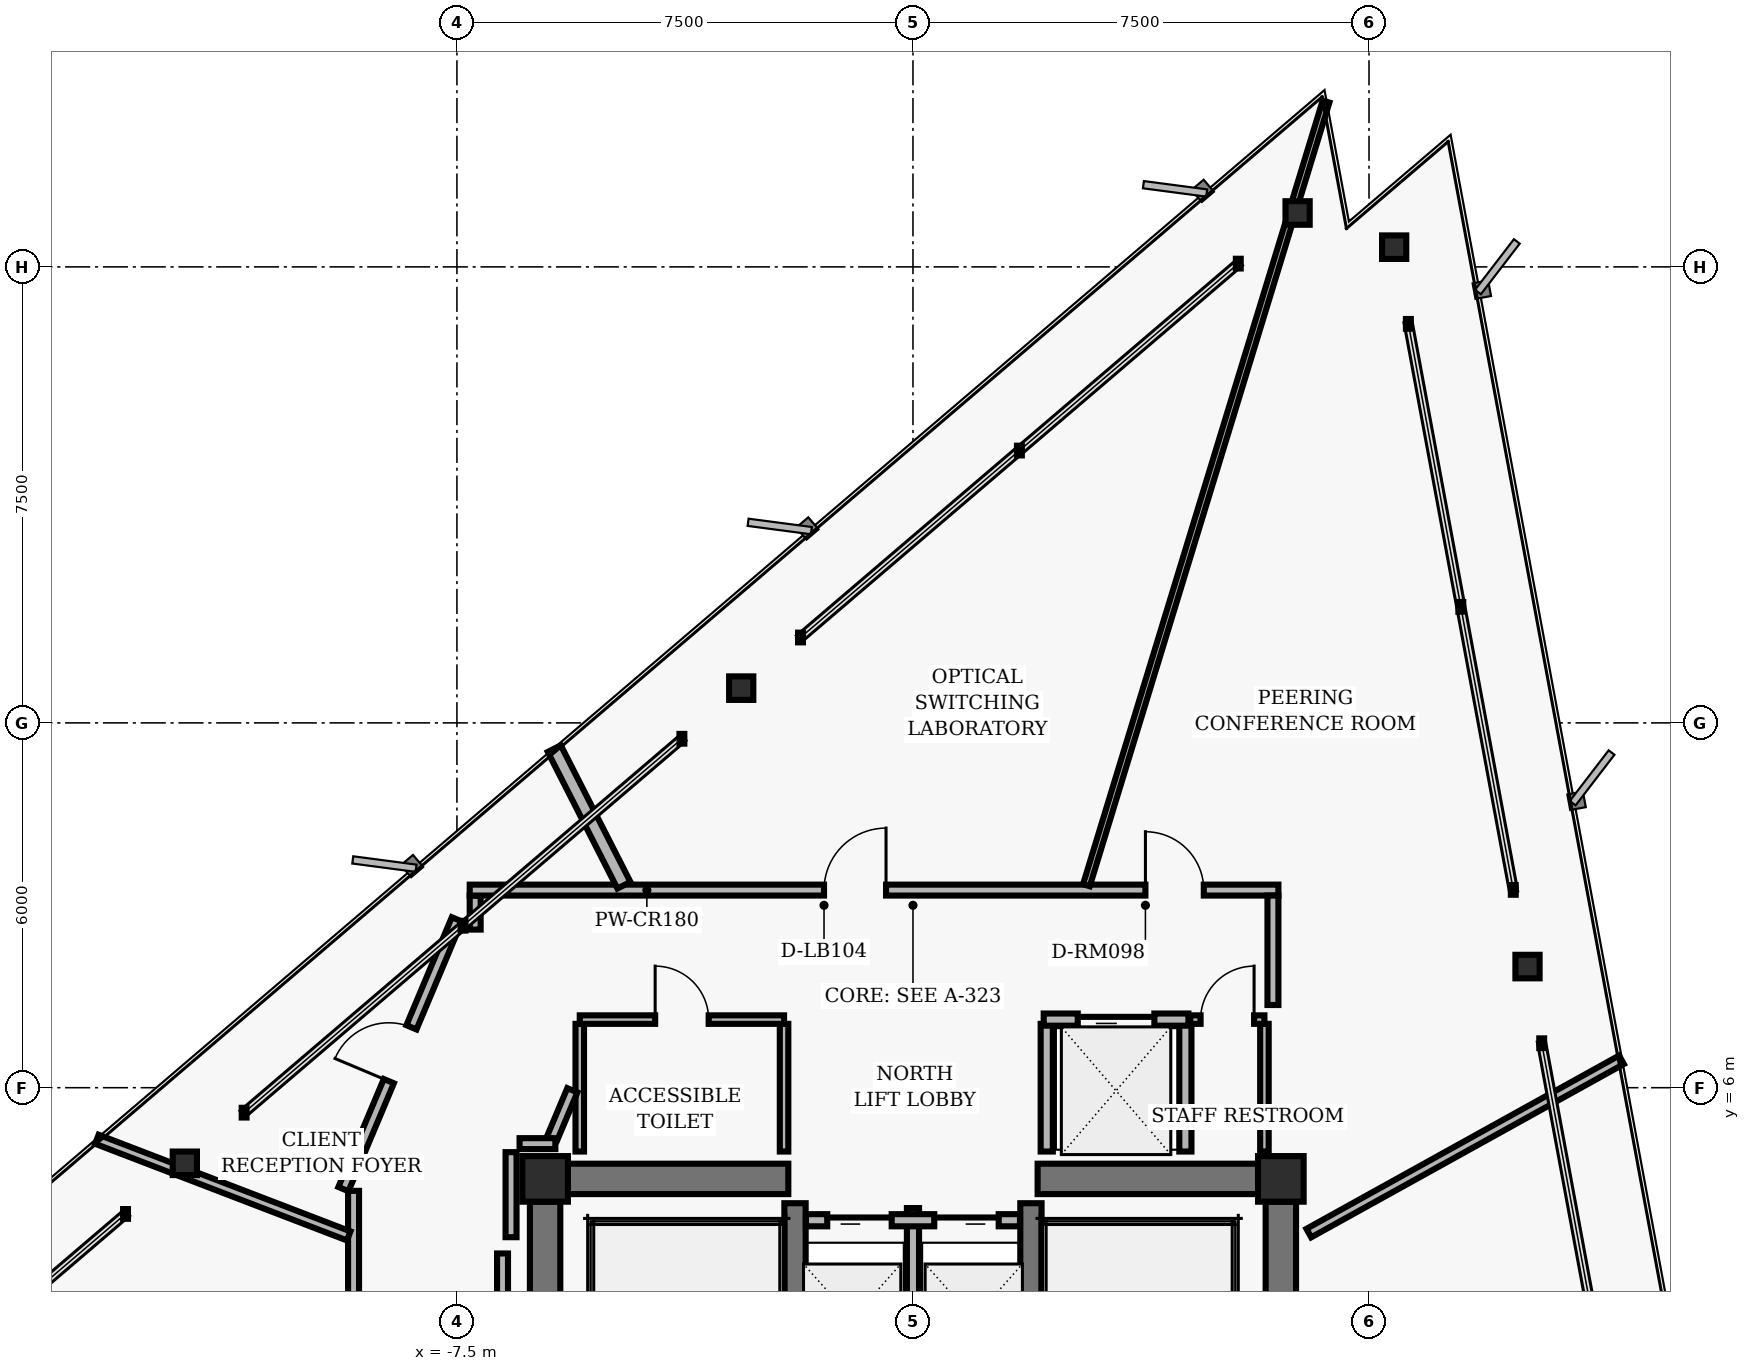
"""IFC4 building model, lengths in metres.
Left out: names, types, materials, properties, quantities, classifications, styles, units other than length and angle.
Written with IfcOpenShell. Run it as: python <this file> out.ifc"""

import sys

from ifc_helpers import new_model, si_unit, direction, frame, frame_2d, origin, origin_2d, place, context, subcontext, project, spatial, rectangle, hollow_rectangle, i_section, extrude, element, fill, save


model = new_model("IFC4")
c1 = context("Model", 3, precision=1e-05, world=origin(), true_north=direction((0.0, 1.0)))
c2 = subcontext(c1, "Body", "Model", "MODEL_VIEW")
j1 = project(units=[si_unit("LENGTHUNIT", "METRE"), si_unit("PLANEANGLEUNIT", "RADIAN")], contexts=[c1])
p1 = place(None, origin())
s1 = spatial("IfcSite", under=j1, at=p1, CompositionType="ELEMENT")
p2 = place(p1, origin())
s2 = spatial("IfcBuilding", under=s1, at=p2, CompositionType="ELEMENT")
p3 = place(p2, frame((0.0, 0.0, 178.4)))
s3 = spatial("IfcBuildingStorey", under=s2, at=p3, CompositionType="ELEMENT", Elevation=178.4)
for number, where, z_axis, x_axis in (
    (1, (-6.05, 4.5, 0.0), (0.0, 0.0, 1.0), (1.0, 0.0, 0.0)),
    (2, (6.05, 4.5, 0.0), (0.0, 0.0, 1.0), (1.0, 0.0, 0.0)),
):
    element("IfcColumn", number, at=place(p3, frame(where, z_axis=z_axis, x_axis=x_axis)), inside=s3, PredefinedType="COLUMN", context=c2, shape_type="SweptSolid", body=[
        extrude(hollow_rectangle(XDim=0.75, YDim=0.75, WallThickness=0.05, InnerFilletRadius=0.02, OuterFilletRadius=0.04, at=origin_2d()), origin(), (0.0, 0.0, 1.0), 3.04),
    ])
for number, where, z_axis, x_axis in (
    (3, (-6.05, 0.375, 0.0), (0.0, 0.0, 1.0), (0.0, 1.0, 0.0)),
    (4, (6.05, 0.375, 0.0), (0.0, 0.0, 1.0), (0.0, 1.0, 0.0)),
):
    element("IfcWall", number, at=place(p3, frame(where, z_axis=z_axis, x_axis=x_axis)), inside=s3, PredefinedType="SHEAR", context=c2, shape_type="SweptSolid", body=[
        extrude(rectangle(XDim=3.75, YDim=0.5, at=frame_2d((1.875, 0.0))), origin(), (0.0, 0.0, 1.0), 2.798),
    ])
for number, where, z_axis, x_axis in (
    (5, (-1.94, -4.1, 0.0), (0.0, 0.0, 1.0), (0.0, 1.0, 0.0)),
    (6, (1.94, -4.1, 0.0), (0.0, 0.0, 1.0), (0.0, 1.0, 0.0)),
):
    element("IfcWall", number, at=place(p3, frame(where, z_axis=z_axis, x_axis=x_axis)), inside=s3, PredefinedType="SHEAR", context=c2, shape_type="SweptSolid", body=[
        extrude(rectangle(XDim=8.2, YDim=0.35, at=frame_2d((4.1, 0.0))), origin(), (0.0, 0.0, 1.0), 2.798),
    ])
for number, where, z_axis, x_axis in (
    (7, (-5.675, 4.5, 0.0), (0.0, 0.0, 1.0), (1.0, 0.0, 0.0)),
    (8, (2.05, 4.5, 0.0), (0.0, 0.0, 1.0), (1.0, 0.0, 0.0)),
):
    element("IfcWall", number, at=place(p3, frame(where, z_axis=z_axis, x_axis=x_axis)), inside=s3, PredefinedType="SHEAR", context=c2, shape_type="SweptSolid", body=[
        extrude(rectangle(XDim=3.625, YDim=0.5, at=frame_2d((1.812, 0.0))), origin(), (0.0, 0.0, 1.0), 2.798),
    ])
for number, where, z_axis, x_axis in (
    (9, (10.107, 7.992, 0.0), (0.0, 0.0, 1.0), (1.0, 0.0, 0.0)),
    (10, (7.914, 19.824, 0.0), (0.0, 0.0, 1.0), (1.0, 0.0, 0.0)),
    (11, (6.325, 20.387, 0.0), (0.0, 0.0, 1.0), (1.0, 0.0, 0.0)),
    (12, (-2.825, 12.572, 0.0), (0.0, 0.0, 1.0), (1.0, 0.0, 0.0)),
    (13, (-11.975, 4.757, 0.0), (0.0, 0.0, 1.0), (1.0, 0.0, 0.0)),
):
    element("IfcColumn", number, at=place(p3, frame(where, z_axis=z_axis, x_axis=x_axis)), inside=s3, PredefinedType="COLUMN", context=c2, shape_type="SweptSolid", body=[
        extrude(i_section(OverallWidth=0.398, OverallDepth=0.387, WebThickness=0.021, FlangeThickness=0.033, FilletRadius=0.018, at=origin_2d()), origin(), (0.0, 0.0, 1.0), 3.04),
    ])
p4 = place(p3, frame((0.0, 1.25, 0.0), z_axis=(0.0, 0.0, 1.0), x_axis=(0.0, 1.0, 0.0)))
e14 = element("IfcWall", 14, at=p4, inside=s3, PredefinedType="PARTITIONING", context=c2, shape_type="SweptSolid", body=[
    extrude(rectangle(XDim=2.77, YDim=0.2, at=frame_2d((1.385, 0.0))), origin(), (0.0, 0.0, 1.0), 2.773),
])
p5 = place(p3, frame((-1.76, 3.82, 0.0), z_axis=(0.0, 0.0, 1.0), x_axis=(1.0, 0.0, 0.0)))
e15 = element("IfcWall", 15, at=p5, inside=s3, PredefinedType="PARTITIONING", context=c2, shape_type="SweptSolid", body=[
    extrude(rectangle(XDim=3.52, YDim=0.2, at=frame_2d((1.76, 0.0))), origin(), (0.0, 0.0, 1.0), 2.773),
])
p6 = place(p5, frame((0.35, 0.0, 0.0)))
e16 = element("IfcOpeningElement", 16, at=p6, cuts=e15, PredefinedType="OPENING", context=c2, shape_type="SweptSolid", body=[
    extrude(rectangle(XDim=1.06, YDim=2.04, at=frame_2d((0.53, 1.02))), frame((0.0, 0.11, 0.0), z_axis=(0.0, -1.0, 0.0), x_axis=(1.0, 0.0, 0.0)), (0.0, 0.0, 1.0), 0.22),
])
p7 = place(p5, frame((2.11, 0.0, 0.0)))
e17 = element("IfcOpeningElement", 17, at=p7, cuts=e15, PredefinedType="OPENING", context=c2, shape_type="SweptSolid", body=[
    extrude(rectangle(XDim=1.06, YDim=2.04, at=frame_2d((0.53, 1.02))), frame((0.0, 0.11, 0.0), z_axis=(0.0, -1.0, 0.0), x_axis=(1.0, 0.0, 0.0)), (0.0, 0.0, 1.0), 0.22),
])
for number, where, z_axis, x_axis in (
    (18, (2.2, 4.95, 0.0), (0.0, 0.0, 1.0), (0.0, 1.0, 0.0)),
    (19, (4.48, 4.95, 0.0), (0.0, 0.0, 1.0), (0.0, 1.0, 0.0)),
):
    element("IfcWall", number, at=place(p3, frame(where, z_axis=z_axis, x_axis=x_axis)), inside=s3, PredefinedType="PARTITIONING", context=c2, shape_type="SweptSolid", body=[
        extrude(rectangle(XDim=2.1, YDim=0.2, at=frame_2d((1.05, 0.0))), origin(), (0.0, 0.0, 1.0), 2.773),
    ])
p8 = place(p3, frame((2.15, 7.12, 0.0), z_axis=(0.0, 0.0, 1.0), x_axis=(1.0, 0.0, 0.0)))
e20 = element("IfcWall", 20, at=p8, inside=s3, PredefinedType="PARTITIONING", context=c2, shape_type="SweptSolid", body=[
    extrude(rectangle(XDim=2.38, YDim=0.2, at=frame_2d((1.19, 0.0))), origin(), (0.0, 0.0, 1.0), 2.773),
])
p9 = place(p8, frame((0.56, 0.0, 0.0)))
e21 = element("IfcOpeningElement", 21, at=p9, cuts=e20, PredefinedType="OPENING", context=c2, shape_type="SweptSolid", body=[
    extrude(rectangle(XDim=1.26, YDim=2.06, at=frame_2d((0.63, 1.03))), frame((0.0, 0.11, 0.0), z_axis=(0.0, -1.0, 0.0), x_axis=(1.0, 0.0, 0.0)), (0.0, 0.0, 1.0), 0.22),
])
for number, where, z_axis, x_axis in (
    (22, (-5.48, 4.95, 0.0), (0.0, 0.0, 1.0), (0.0, 1.0, 0.0)),
    (23, (-2.12, 4.95, 0.0), (0.0, 0.0, 1.0), (0.0, 1.0, 0.0)),
):
    element("IfcWall", number, at=place(p3, frame(where, z_axis=z_axis, x_axis=x_axis)), inside=s3, PredefinedType="PARTITIONING", context=c2, shape_type="SweptSolid", body=[
        extrude(rectangle(XDim=2.1, YDim=0.14, at=frame_2d((1.05, 0.0))), origin(), (0.0, 0.0, 1.0), 2.773),
    ])
p10 = place(p3, frame((-5.48, 7.12, 0.0), z_axis=(0.0, 0.0, 1.0), x_axis=(1.0, 0.0, 0.0)))
e24 = element("IfcWall", 24, at=p10, inside=s3, PredefinedType="PARTITIONING", context=c2, shape_type="SweptSolid", body=[
    extrude(rectangle(XDim=3.36, YDim=0.14, at=frame_2d((1.68, 0.0))), origin(), (0.0, 0.0, 1.0), 2.773),
])
p11 = place(p10, frame((1.24, 0.0, 0.0)))
e25 = element("IfcOpeningElement", 25, at=p11, cuts=e24, PredefinedType="OPENING", context=c2, shape_type="SweptSolid", body=[
    extrude(rectangle(XDim=0.88, YDim=2.02, at=frame_2d((0.44, 1.01))), frame((0.0, 0.08, 0.0), z_axis=(0.0, -1.0, 0.0), x_axis=(1.0, 0.0, 0.0)), (0.0, 0.0, 1.0), 0.16),
])
p12 = place(p3, frame((5.78, 4.95, 0.0), z_axis=(0.0, 0.0, 1.0), x_axis=(0.0, 1.0, 0.0)))
e26 = element("IfcWall", 26, at=p12, inside=s3, PredefinedType="PARTITIONING", context=c2, shape_type="SweptSolid", body=[
    extrude(rectangle(XDim=2.1, YDim=0.14, at=frame_2d((1.05, 0.0))), origin(), (0.0, 0.0, 1.0), 2.253),
])
p13 = place(p3, frame((4.56, 7.12, 0.0), z_axis=(0.0, 0.0, 1.0), x_axis=(1.0, 0.0, 0.0)))
e27 = element("IfcWall", 27, at=p13, inside=s3, PredefinedType="PARTITIONING", context=c2, shape_type="SweptSolid", body=[
    extrude(rectangle(XDim=1.22, YDim=0.14, at=frame_2d((0.61, 0.0))), origin(), (0.0, 0.0, 1.0), 2.773),
])
p14 = place(p13, frame((0.17, 0.0, 0.0)))
e28 = element("IfcOpeningElement", 28, at=p14, cuts=e27, PredefinedType="OPENING", context=c2, shape_type="SweptSolid", body=[
    extrude(rectangle(XDim=0.88, YDim=2.02, at=frame_2d((0.44, 1.01))), frame((0.0, 0.08, 0.0), z_axis=(0.0, -1.0, 0.0), x_axis=(1.0, 0.0, 0.0)), (0.0, 0.0, 1.0), 0.16),
])
p15 = place(p3, frame((-9.2, -4.303, 0.0), z_axis=(0.0, 0.0, 1.0), x_axis=(0.0, 1.0, 0.0)))
e29 = element("IfcWall", 29, at=p15, inside=s3, PredefinedType="PARTITIONING", context=c2, shape_type="SweptSolid", body=[
    extrude(rectangle(XDim=8.607, YDim=0.18, at=frame_2d((4.303, 0.0))), origin(), (0.0, 0.0, 1.0), 2.773),
])
p16 = place(p15, frame((3.582, 0.0, 0.0)))
e30 = element("IfcOpeningElement", 30, at=p16, cuts=e29, PredefinedType="OPENING", context=c2, shape_type="SweptSolid", body=[
    extrude(rectangle(XDim=0.96, YDim=2.02, at=frame_2d((0.48, 1.01))), frame((0.0, 0.1, 0.0), z_axis=(0.0, -1.0, 0.0), x_axis=(1.0, 0.0, 0.0)), (0.0, 0.0, 1.0), 0.2),
])
p17 = place(p3, frame((-9.367, 4.332, 0.0), z_axis=(0.0, 0.0, 1.0), x_axis=(0.387573945081, 0.921838617706, 0.0)))
e31 = element("IfcWall", 31, at=p17, inside=s3, PredefinedType="PARTITIONING", context=c2, shape_type="SweptSolid", body=[
    extrude(rectangle(XDim=4.813, YDim=0.18, at=frame_2d((2.407, 0.0))), origin(), (0.0, 0.0, 1.0), 2.395),
])
p18 = place(p17, frame((1.927, 0.0, 0.0)))
e32 = element("IfcOpeningElement", 32, at=p18, cuts=e31, PredefinedType="OPENING", context=c2, shape_type="SweptSolid", body=[
    extrude(rectangle(XDim=0.96, YDim=2.02, at=frame_2d((0.48, 1.01))), frame((0.0, 0.1, 0.0), z_axis=(0.0, -1.0, 0.0), x_axis=(1.0, 0.0, 0.0)), (0.0, 0.0, 1.0), 0.2),
])
p19 = place(p3, frame((-7.2, 8.601, 0.0), z_axis=(0.0, 0.0, 1.0), x_axis=(0.0, 1.0, 0.0)))
e33 = element("IfcWall", 33, at=p19, inside=s3, PredefinedType="PARTITIONING", context=c2, shape_type="SweptSolid", body=[
    extrude(rectangle(XDim=0.559, YDim=0.18, at=frame_2d((0.28, 0.0))), origin(), (0.0, 0.0, 1.0), 2.773),
])
p20 = place(p3, frame((-7.29, 9.25, 0.0), z_axis=(0.0, 0.0, 1.0), x_axis=(1.0, 0.0, 0.0)))
e34 = element("IfcWall", 34, at=p20, inside=s3, PredefinedType="PARTITIONING", context=c2, shape_type="SweptSolid", body=[
    extrude(rectangle(XDim=13.3, YDim=0.18, at=frame_2d((6.65, 0.0))), origin(), (0.0, 0.0, 1.0), 2.773),
])
p21 = place(p20, frame((11.113, 0.0, 0.0)))
e35 = element("IfcOpeningElement", 35, at=p21, cuts=e34, PredefinedType="OPENING", context=c2, shape_type="SweptSolid", body=[
    extrude(rectangle(XDim=0.96, YDim=2.02, at=frame_2d((0.48, 1.01))), frame((0.0, 0.1, 0.0), z_axis=(0.0, -1.0, 0.0), x_axis=(1.0, 0.0, 0.0)), (0.0, 0.0, 1.0), 0.2),
])
p22 = place(p20, frame((5.827, 0.0, 0.0)))
e36 = element("IfcOpeningElement", 36, at=p22, cuts=e34, PredefinedType="OPENING", context=c2, shape_type="SweptSolid", body=[
    extrude(rectangle(XDim=1.02, YDim=2.02, at=frame_2d((0.51, 1.01))), frame((0.0, 0.1, 0.0), z_axis=(0.0, -1.0, 0.0), x_axis=(1.0, 0.0, 0.0)), (0.0, 0.0, 1.0), 0.2),
])
p23 = place(p3, frame((5.92, 9.16, 0.0), z_axis=(0.0, 0.0, 1.0), x_axis=(0.0, -1.0, 0.0)))
e37 = element("IfcWall", 37, at=p23, inside=s3, PredefinedType="PARTITIONING", context=c2, shape_type="SweptSolid", body=[
    extrude(rectangle(XDim=1.8, YDim=0.18, at=frame_2d((0.9, 0.0))), origin(), (0.0, 0.0, 1.0), 2.253),
])
p24 = place(p3, frame((-5.602, 5.958, 0.0), z_axis=(0.0, 0.0, 1.0), x_axis=(-0.387588639363, -0.921832439566, 0.0)))
e38 = element("IfcWall", 38, at=p24, inside=s3, PredefinedType="PARTITIONING", context=c2, shape_type="SweptSolid", body=[
    extrude(rectangle(XDim=0.862, YDim=0.18, at=frame_2d((0.431, 0.0))), origin(), (0.0, 0.0, 1.0), 2.773),
])
p25 = place(p3, frame((-5.881, 5.08, 0.0), z_axis=(0.0, 0.0, 1.0), x_axis=(-1.0, 0.0, 0.0)))
e39 = element("IfcWall", 39, at=p25, inside=s3, PredefinedType="PARTITIONING", context=c2, shape_type="SweptSolid", body=[
    extrude(rectangle(XDim=0.589, YDim=0.18, at=frame_2d((0.294, 0.0))), origin(), (0.0, 0.0, 1.0), 2.773),
])
p26 = place(p3, frame((-6.61, 4.94, 0.0), z_axis=(0.0, 0.0, 1.0), x_axis=(0.0, -1.0, 0.0)))
e40 = element("IfcWall", 40, at=p26, inside=s3, PredefinedType="PARTITIONING", context=c2, shape_type="SweptSolid", body=[
    extrude(rectangle(XDim=1.399, YDim=0.18, at=frame_2d((0.699, 0.0))), origin(), (0.0, 0.0, 1.0), 2.773),
])
p27 = place(p3, frame((-6.75, 3.273, 0.0), z_axis=(0.0, 0.0, 1.0), x_axis=(0.0, -1.0, 0.0)))
e41 = element("IfcWall", 41, at=p27, inside=s3, PredefinedType="PARTITIONING", context=c2, shape_type="SweptSolid", body=[
    extrude(rectangle(XDim=6.547, YDim=0.18, at=frame_2d((3.273, 0.0))), origin(), (0.0, 0.0, 1.0), 2.773),
])
p28 = place(p3, frame((6.51, 3.609, 0.0), z_axis=(0.0, 0.0, 1.0), x_axis=(0.874634801292, 0.484782388675, 0.0)))
e42 = element("IfcWall", 42, at=p28, inside=s3, PredefinedType="PARTITIONING", context=c2, shape_type="SweptSolid", body=[
    extrude(rectangle(XDim=5.879, YDim=0.16, at=frame_2d((2.939, 0.0))), origin(), (0.0, 0.0, 1.0), 2.773),
])
p29 = place(p3, frame((2.853, 9.33, 0.0), z_axis=(0.0, 0.0, 1.0), x_axis=(0.292365790083, 0.95630656423, 0.0)))
e43 = element("IfcWall", 43, at=p29, inside=s3, PredefinedType="MOVABLE", context=c2, shape_type="SweptSolid", body=[
    extrude(rectangle(XDim=13.479, YDim=0.115, at=frame_2d((6.739, 0.0))), origin(), (0.0, 0.0, 1.0), 2.253),
])
p30 = place(p3, frame((-4.754, 9.33, 0.0), z_axis=(0.0, 0.0, 1.0), x_axis=(-0.453977993214, 0.891012896471, 0.0)))
e44 = element("IfcWall", 44, at=p30, inside=s3, PredefinedType="PARTITIONING", context=c2, shape_type="SweptSolid", body=[
    extrude(rectangle(XDim=2.522, YDim=0.24, at=frame_2d((1.261, 0.0))), origin(), (0.0, 0.0, 1.0), 2.773),
])
p31 = place(p3, frame((-9.28, 3.562, 0.0), z_axis=(0.0, 0.0, 1.0), x_axis=(-0.933582300371, 0.3583630679, 0.0)))
e45 = element("IfcWall", 45, at=p31, inside=s3, PredefinedType="PARTITIONING", context=c2, shape_type="SweptSolid", body=[
    extrude(rectangle(XDim=4.436, YDim=0.16, at=frame_2d((2.218, 0.0))), origin(), (0.0, 0.0, 1.0), 2.773),
])
p32 = place(p6, origin())
e46 = element("IfcDoor", 46, at=p32, inside=s3, OperationType="SLIDING_TO_LEFT", PredefinedType="DOOR", context=c2, shape_type="SweptSolid", body=[
    extrude(rectangle(XDim=1.06, YDim=2.04, at=frame_2d((0.53, 1.02))), frame((0.0, 0.025, 0.0), z_axis=(0.0, -1.0, 0.0), x_axis=(1.0, 0.0, 0.0)), (0.0, 0.0, 1.0), 0.05),
])
fill(e16, e46)
p33 = place(p7, origin())
e47 = element("IfcDoor", 47, at=p33, inside=s3, OperationType="SLIDING_TO_RIGHT", PredefinedType="DOOR", context=c2, shape_type="SweptSolid", body=[
    extrude(rectangle(XDim=1.06, YDim=2.04, at=frame_2d((0.53, 1.02))), frame((0.0, 0.025, 0.0), z_axis=(0.0, -1.0, 0.0), x_axis=(1.0, 0.0, 0.0)), (0.0, 0.0, 1.0), 0.05),
])
fill(e17, e47)
p34 = place(p9, origin())
e48 = element("IfcDoor", 48, at=p34, inside=s3, OperationType="SLIDING_TO_LEFT", PredefinedType="DOOR", context=c2, shape_type="SweptSolid", body=[
    extrude(rectangle(XDim=1.26, YDim=2.06, at=frame_2d((0.63, 1.03))), frame((0.0, 0.025, 0.0), z_axis=(0.0, -1.0, 0.0), x_axis=(1.0, 0.0, 0.0)), (0.0, 0.0, 1.0), 0.05),
])
fill(e21, e48)
p35 = place(p11, origin())
e49 = element("IfcDoor", 49, at=p35, inside=s3, OperationType="SINGLE_SWING_LEFT", PredefinedType="DOOR", context=c2, shape_type="SweptSolid", body=[
    extrude(rectangle(XDim=0.88, YDim=2.02, at=frame_2d((0.44, 1.01))), frame((0.0, 0.025, 0.0), z_axis=(0.0, -1.0, 0.0), x_axis=(1.0, 0.0, 0.0)), (0.0, 0.0, 1.0), 0.05),
])
fill(e25, e49)
p36 = place(p14, origin())
e50 = element("IfcDoor", 50, at=p36, inside=s3, OperationType="SINGLE_SWING_RIGHT", PredefinedType="DOOR", context=c2, shape_type="SweptSolid", body=[
    extrude(rectangle(XDim=0.88, YDim=2.02, at=frame_2d((0.44, 1.01))), frame((0.0, 0.025, 0.0), z_axis=(0.0, -1.0, 0.0), x_axis=(1.0, 0.0, 0.0)), (0.0, 0.0, 1.0), 0.05),
])
fill(e28, e50)
p37 = place(p21, origin())
e51 = element("IfcDoor", 51, at=p37, inside=s3, OperationType="SINGLE_SWING_LEFT", PredefinedType="DOOR", context=c2, shape_type="SweptSolid", body=[
    extrude(rectangle(XDim=0.96, YDim=2.02, at=frame_2d((0.48, 1.01))), frame((0.0, 0.025, 0.0), z_axis=(0.0, -1.0, 0.0), x_axis=(1.0, 0.0, 0.0)), (0.0, 0.0, 1.0), 0.05),
])
fill(e35, e51)
p38 = place(p22, origin())
e52 = element("IfcDoor", 52, at=p38, inside=s3, OperationType="SINGLE_SWING_RIGHT", PredefinedType="DOOR", context=c2, shape_type="SweptSolid", body=[
    extrude(rectangle(XDim=1.02, YDim=2.02, at=frame_2d((0.51, 1.01))), frame((0.0, 0.025, 0.0), z_axis=(0.0, -1.0, 0.0), x_axis=(1.0, 0.0, 0.0)), (0.0, 0.0, 1.0), 0.05),
])
fill(e36, e52)
p39 = place(p18, origin())
e53 = element("IfcDoor", 53, at=p39, inside=s3, OperationType="SINGLE_SWING_LEFT", PredefinedType="DOOR", context=c2, shape_type="SweptSolid", body=[
    extrude(rectangle(XDim=0.96, YDim=2.02, at=frame_2d((0.48, 1.01))), frame((0.0, 0.025, 0.0), z_axis=(0.0, -1.0, 0.0), x_axis=(1.0, 0.0, 0.0)), (0.0, 0.0, 1.0), 0.05),
])
fill(e32, e53)
save(model, sys.argv[1])
